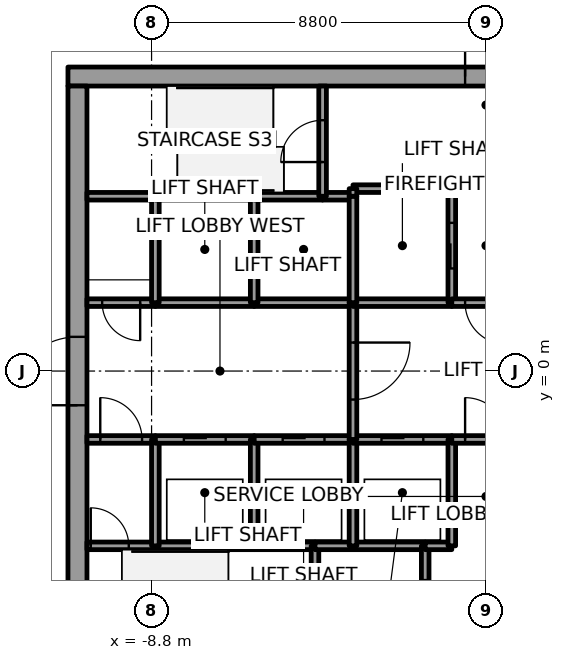
"""IFC4 building model, lengths in metres.
Left out: names, types, materials, properties, quantities, classifications, styles, units other than length and angle.
Written with IfcOpenShell. Run it as: python <this file> out.ifc"""

import sys

from ifc_helpers import new_model, si_unit, direction, frame, frame_2d, origin, place, context, subcontext, project, spatial, rectangle, extrude, element, fill, save


model = new_model("IFC4")
c1 = context("Model", 3, precision=1e-05, world=origin(), true_north=direction((0.0, 1.0)))
c2 = subcontext(c1, "Body", "Model", "MODEL_VIEW")
j1 = project(units=[si_unit("LENGTHUNIT", "METRE"), si_unit("PLANEANGLEUNIT", "RADIAN")], contexts=[c1])
p1 = place(None, origin())
s1 = spatial("IfcSite", under=j1, at=p1, CompositionType="ELEMENT")
p2 = place(p1, origin())
s2 = spatial("IfcBuilding", under=s1, at=p2, CompositionType="ELEMENT")
p3 = place(p2, frame((0.0, 0.0, 22.2)))
s3 = spatial("IfcBuildingStorey", under=s2, at=p3, CompositionType="ELEMENT", Elevation=22.2)
p4 = place(p3, frame((-11.0, 7.75, 0.0), z_axis=(0.0, 0.0, 1.0), x_axis=(1.0, 0.0, 0.0)))
e1 = element("IfcWall", 1, at=p4, inside=s3, PredefinedType="SHEAR", context=c2, shape_type="SweptSolid", body=[
    extrude(rectangle(XDim=22.0, YDim=0.5, at=frame_2d((11.0, 0.0))), origin(), (0.0, 0.0, 1.0), 6.6),
])
p5 = place(p4, frame((10.45, 0.0, 0.0)))
e2 = element("IfcOpeningElement", 2, at=p5, cuts=e1, PredefinedType="OPENING", context=c2, shape_type="SweptSolid", body=[
    extrude(rectangle(XDim=1.1, YDim=2.1, at=frame_2d((0.55, 1.05))), frame((0.0, 0.25, 0.0), z_axis=(0.0, -1.0, 0.0), x_axis=(1.0, 0.0, 0.0)), (0.0, 0.0, 1.0), 0.5),
])
p6 = place(p3, frame((-10.75, -7.5, 0.0), z_axis=(0.0, 0.0, 1.0), x_axis=(0.0, 1.0, 0.0)))
e3 = element("IfcWall", 3, at=p6, inside=s3, PredefinedType="SHEAR", context=c2, shape_type="SweptSolid", body=[
    extrude(rectangle(XDim=15.0, YDim=0.5, at=frame_2d((7.5, 0.0))), origin(), (0.0, 0.0, 1.0), 6.6),
])
p7 = place(p6, frame((6.6, 0.0, 0.0)))
e4 = element("IfcOpeningElement", 4, at=p7, cuts=e3, PredefinedType="OPENING", context=c2, shape_type="SweptSolid", body=[
    extrude(rectangle(XDim=1.8, YDim=2.1, at=frame_2d((0.9, 1.05))), frame((0.0, 0.25, 0.0), z_axis=(0.0, -1.0, 0.0), x_axis=(1.0, 0.0, 0.0)), (0.0, 0.0, 1.0), 0.5),
])
p8 = place(p3, frame((-10.5, -4.6, 0.0), z_axis=(0.0, 0.0, 1.0), x_axis=(1.0, 0.0, 0.0)))
e5 = element("IfcWall", 5, at=p8, inside=s3, PredefinedType="SOLIDWALL", context=c2, shape_type="SweptSolid", body=[
    extrude(rectangle(XDim=1.8, YDim=0.2, at=frame_2d((0.9, 0.0))), origin(), (0.0, 0.0, 1.0), 6.35),
])
p9 = place(p8, frame((0.1, 0.0, 0.0)))
e6 = element("IfcOpeningElement", 6, at=p9, cuts=e5, PredefinedType="OPENING", context=c2, shape_type="SweptSolid", body=[
    extrude(rectangle(XDim=1.0, YDim=2.1, at=frame_2d((0.5, 1.05))), frame((0.0, 0.1, 0.0), z_axis=(0.0, -1.0, 0.0), x_axis=(1.0, 0.0, 0.0)), (0.0, 0.0, 1.0), 0.2),
])
p10 = place(p3, frame((-10.5, -1.8, 0.0), z_axis=(0.0, 0.0, 1.0), x_axis=(1.0, 0.0, 0.0)))
e7 = element("IfcWall", 7, at=p10, inside=s3, PredefinedType="SOLIDWALL", context=c2, shape_type="SweptSolid", body=[
    extrude(rectangle(XDim=1.8, YDim=0.2, at=frame_2d((0.9, 0.0))), origin(), (0.0, 0.0, 1.0), 6.35),
])
p11 = place(p10, frame((0.35, 0.0, 0.0)))
e8 = element("IfcOpeningElement", 8, at=p11, cuts=e7, PredefinedType="OPENING", context=c2, shape_type="SweptSolid", body=[
    extrude(rectangle(XDim=1.1, YDim=2.4, at=frame_2d((0.55, 1.2))), frame((0.0, 0.1, 0.0), z_axis=(0.0, -1.0, 0.0), x_axis=(1.0, 0.0, 0.0)), (0.0, 0.0, 1.0), 0.2),
])
p12 = place(p3, frame((-8.7, 1.8, 0.0), z_axis=(0.0, 0.0, 1.0), x_axis=(-1.0, 0.0, 0.0)))
e9 = element("IfcWall", 9, at=p12, inside=s3, PredefinedType="SOLIDWALL", context=c2, shape_type="SweptSolid", body=[
    extrude(rectangle(XDim=1.8, YDim=0.2, at=frame_2d((0.9, 0.0))), origin(), (0.0, 0.0, 1.0), 6.35),
])
p13 = place(p12, frame((0.4, 0.0, 0.0)))
e10 = element("IfcOpeningElement", 10, at=p13, cuts=e9, PredefinedType="OPENING", context=c2, shape_type="SweptSolid", body=[
    extrude(rectangle(XDim=1.0, YDim=2.4, at=frame_2d((0.5, 1.2))), frame((0.0, 0.1, 0.0), z_axis=(0.0, -1.0, 0.0), x_axis=(1.0, 0.0, 0.0)), (0.0, 0.0, 1.0), 0.2),
])
p14 = place(p3, frame((-8.7, 4.6, 0.0), z_axis=(0.0, 0.0, 1.0), x_axis=(-1.0, 0.0, 0.0)))
e11 = element("IfcWall", 11, at=p14, inside=s3, PredefinedType="SOLIDWALL", context=c2, shape_type="SweptSolid", body=[
    extrude(rectangle(XDim=1.8, YDim=0.2, at=frame_2d((0.9, 0.0))), origin(), (0.0, 0.0, 1.0), 6.35),
])
p15 = place(p3, frame((-8.7, -4.6, 0.0), z_axis=(0.0, 0.0, 1.0), x_axis=(1.0, 0.0, 0.0)))
e12 = element("IfcWall", 12, at=p15, inside=s3, PredefinedType="SOLIDWALL", context=c2, shape_type="SweptSolid", body=[
    extrude(rectangle(XDim=2.6, YDim=0.2, at=frame_2d((1.3, 0.0))), origin(), (0.0, 0.0, 1.0), 6.35),
])
p16 = place(p3, frame((-8.7, -4.6, 0.0), z_axis=(0.0, 0.0, 1.0), x_axis=(0.0, 1.0, 0.0)))
e13 = element("IfcWall", 13, at=p16, inside=s3, PredefinedType="SOLIDWALL", context=c2, shape_type="SweptSolid", body=[
    extrude(rectangle(XDim=2.8, YDim=0.2, at=frame_2d((1.4, 0.0))), origin(), (0.0, 0.0, 1.0), 6.35),
])
p17 = place(p3, frame((-8.7, -1.8, 0.0), z_axis=(0.0, 0.0, 1.0), x_axis=(1.0, 0.0, 0.0)))
e14 = element("IfcWall", 14, at=p17, inside=s3, PredefinedType="SOLIDWALL", context=c2, shape_type="SweptSolid", body=[
    extrude(rectangle(XDim=2.6, YDim=0.2, at=frame_2d((1.3, 0.0))), origin(), (0.0, 0.0, 1.0), 6.35),
])
p18 = place(p17, frame((0.75, 0.0, 0.0)))
e15 = element("IfcOpeningElement", 15, at=p18, cuts=e14, PredefinedType="OPENING", context=c2, shape_type="SweptSolid", body=[
    extrude(rectangle(XDim=1.1, YDim=2.1, at=frame_2d((0.55, 1.05))), frame((0.0, 0.1, 0.0), z_axis=(0.0, -1.0, 0.0), x_axis=(1.0, 0.0, 0.0)), (0.0, 0.0, 1.0), 0.2),
])
p19 = place(p3, frame((-6.1, 1.8, 0.0), z_axis=(0.0, 0.0, 1.0), x_axis=(-1.0, 0.0, 0.0)))
e16 = element("IfcWall", 16, at=p19, inside=s3, PredefinedType="SOLIDWALL", context=c2, shape_type="SweptSolid", body=[
    extrude(rectangle(XDim=2.6, YDim=0.2, at=frame_2d((1.3, 0.0))), origin(), (0.0, 0.0, 1.0), 6.35),
])
p20 = place(p3, frame((-8.7, 1.8, 0.0), z_axis=(0.0, 0.0, 1.0), x_axis=(0.0, 1.0, 0.0)))
e17 = element("IfcWall", 17, at=p20, inside=s3, PredefinedType="SOLIDWALL", context=c2, shape_type="SweptSolid", body=[
    extrude(rectangle(XDim=2.8, YDim=0.2, at=frame_2d((1.4, 0.0))), origin(), (0.0, 0.0, 1.0), 6.35),
])
p21 = place(p3, frame((-6.1, 4.6, 0.0), z_axis=(0.0, 0.0, 1.0), x_axis=(-1.0, 0.0, 0.0)))
e18 = element("IfcWall", 18, at=p21, inside=s3, PredefinedType="SOLIDWALL", context=c2, shape_type="SweptSolid", body=[
    extrude(rectangle(XDim=2.6, YDim=0.2, at=frame_2d((1.3, 0.0))), origin(), (0.0, 0.0, 1.0), 6.35),
])
p22 = place(p3, frame((-6.1, -4.6, 0.0), z_axis=(0.0, 0.0, 1.0), x_axis=(1.0, 0.0, 0.0)))
e19 = element("IfcWall", 19, at=p22, inside=s3, PredefinedType="SOLIDWALL", context=c2, shape_type="SweptSolid", body=[
    extrude(rectangle(XDim=1.6, YDim=0.2, at=frame_2d((0.8, 0.0))), origin(), (0.0, 0.0, 1.0), 6.35),
])
p23 = place(p3, frame((-6.1, -4.6, 0.0), z_axis=(0.0, 0.0, 1.0), x_axis=(0.0, 1.0, 0.0)))
e20 = element("IfcWall", 20, at=p23, inside=s3, PredefinedType="SOLIDWALL", context=c2, shape_type="SweptSolid", body=[
    extrude(rectangle(XDim=2.8, YDim=0.2, at=frame_2d((1.4, 0.0))), origin(), (0.0, 0.0, 1.0), 6.35),
])
p24 = place(p3, frame((-6.1, -1.8, 0.0), z_axis=(0.0, 0.0, 1.0), x_axis=(1.0, 0.0, 0.0)))
e21 = element("IfcWall", 21, at=p24, inside=s3, PredefinedType="SOLIDWALL", context=c2, shape_type="SweptSolid", body=[
    extrude(rectangle(XDim=2.6, YDim=0.2, at=frame_2d((1.3, 0.0))), origin(), (0.0, 0.0, 1.0), 6.35),
])
p25 = place(p24, frame((0.75, 0.0, 0.0)))
e22 = element("IfcOpeningElement", 22, at=p25, cuts=e21, PredefinedType="OPENING", context=c2, shape_type="SweptSolid", body=[
    extrude(rectangle(XDim=1.1, YDim=2.1, at=frame_2d((0.55, 1.05))), frame((0.0, 0.1, 0.0), z_axis=(0.0, -1.0, 0.0), x_axis=(1.0, 0.0, 0.0)), (0.0, 0.0, 1.0), 0.2),
])
p26 = place(p3, frame((-3.5, 1.8, 0.0), z_axis=(0.0, 0.0, 1.0), x_axis=(-1.0, 0.0, 0.0)))
e23 = element("IfcWall", 23, at=p26, inside=s3, PredefinedType="SOLIDWALL", context=c2, shape_type="SweptSolid", body=[
    extrude(rectangle(XDim=2.6, YDim=0.2, at=frame_2d((1.3, 0.0))), origin(), (0.0, 0.0, 1.0), 6.35),
])
p27 = place(p3, frame((-6.1, 1.8, 0.0), z_axis=(0.0, 0.0, 1.0), x_axis=(0.0, 1.0, 0.0)))
e24 = element("IfcWall", 24, at=p27, inside=s3, PredefinedType="SOLIDWALL", context=c2, shape_type="SweptSolid", body=[
    extrude(rectangle(XDim=2.8, YDim=0.2, at=frame_2d((1.4, 0.0))), origin(), (0.0, 0.0, 1.0), 6.35),
])
p28 = place(p3, frame((-4.3, 4.6, 0.0), z_axis=(0.0, 0.0, 1.0), x_axis=(-1.0, 0.0, 0.0)))
e25 = element("IfcWall", 25, at=p28, inside=s3, PredefinedType="SOLIDWALL", context=c2, shape_type="SweptSolid", body=[
    extrude(rectangle(XDim=1.8, YDim=0.2, at=frame_2d((0.9, 0.0))), origin(), (0.0, 0.0, 1.0), 6.35),
])
p29 = place(p3, frame((-4.5, -4.6, 0.0), z_axis=(0.0, 0.0, 1.0), x_axis=(0.0, -1.0, 0.0)))
e26 = element("IfcWall", 26, at=p29, inside=s3, PredefinedType="SOLIDWALL", context=c2, shape_type="SweptSolid", body=[
    extrude(rectangle(XDim=2.9, YDim=0.2, at=frame_2d((1.45, 0.0))), origin(), (0.0, 0.0, 1.0), 6.35),
])
p30 = place(p3, frame((-4.5, -4.6, 0.0), z_axis=(0.0, 0.0, 1.0), x_axis=(1.0, 0.0, 0.0)))
e27 = element("IfcWall", 27, at=p30, inside=s3, PredefinedType="SOLIDWALL", context=c2, shape_type="SweptSolid", body=[
    extrude(rectangle(XDim=1.0, YDim=0.2, at=frame_2d((0.5, 0.0))), origin(), (0.0, 0.0, 1.0), 6.35),
])
p31 = place(p3, frame((-3.5, 4.6, 0.0), z_axis=(0.0, 0.0, 1.0), x_axis=(-1.0, 0.0, 0.0)))
e28 = element("IfcWall", 28, at=p31, inside=s3, PredefinedType="SOLIDWALL", context=c2, shape_type="SweptSolid", body=[
    extrude(rectangle(XDim=0.8, YDim=0.2, at=frame_2d((0.4, 0.0))), origin(), (0.0, 0.0, 1.0), 6.35),
])
p32 = place(p3, frame((-4.3, 4.6, 0.0), z_axis=(0.0, 0.0, 1.0), x_axis=(0.0, 1.0, 0.0)))
e29 = element("IfcWall", 29, at=p32, inside=s3, PredefinedType="SOLIDWALL", context=c2, shape_type="SweptSolid", body=[
    extrude(rectangle(XDim=2.9, YDim=0.2, at=frame_2d((1.45, 0.0))), origin(), (0.0, 0.0, 1.0), 6.35),
])
p33 = place(p32, frame((0.9, 0.0, 0.0)))
e30 = element("IfcOpeningElement", 30, at=p33, cuts=e29, PredefinedType="OPENING", context=c2, shape_type="SweptSolid", body=[
    extrude(rectangle(XDim=1.1, YDim=2.4, at=frame_2d((0.55, 1.2))), frame((0.0, 0.1, 0.0), z_axis=(0.0, -1.0, 0.0), x_axis=(1.0, 0.0, 0.0)), (0.0, 0.0, 1.0), 0.2),
])
p34 = place(p3, frame((-3.5, -4.6, 0.0), z_axis=(0.0, 0.0, 1.0), x_axis=(1.0, 0.0, 0.0)))
e31 = element("IfcWall", 31, at=p34, inside=s3, PredefinedType="SOLIDWALL", context=c2, shape_type="SweptSolid", body=[
    extrude(rectangle(XDim=1.9, YDim=0.2, at=frame_2d((0.95, 0.0))), origin(), (0.0, 0.0, 1.0), 6.35),
])
p35 = place(p3, frame((-3.5, -4.6, 0.0), z_axis=(0.0, 0.0, 1.0), x_axis=(0.0, 1.0, 0.0)))
e32 = element("IfcWall", 32, at=p35, inside=s3, PredefinedType="SOLIDWALL", context=c2, shape_type="SweptSolid", body=[
    extrude(rectangle(XDim=2.8, YDim=0.2, at=frame_2d((1.4, 0.0))), origin(), (0.0, 0.0, 1.0), 6.35),
])
p36 = place(p3, frame((-3.5, -1.8, 0.0), z_axis=(0.0, 0.0, 1.0), x_axis=(1.0, 0.0, 0.0)))
e33 = element("IfcWall", 33, at=p36, inside=s3, PredefinedType="SOLIDWALL", context=c2, shape_type="SweptSolid", body=[
    extrude(rectangle(XDim=2.6, YDim=0.2, at=frame_2d((1.3, 0.0))), origin(), (0.0, 0.0, 1.0), 6.35),
])
p37 = place(p36, frame((0.75, 0.0, 0.0)))
e34 = element("IfcOpeningElement", 34, at=p37, cuts=e33, PredefinedType="OPENING", context=c2, shape_type="SweptSolid", body=[
    extrude(rectangle(XDim=1.1, YDim=2.1, at=frame_2d((0.55, 1.05))), frame((0.0, 0.1, 0.0), z_axis=(0.0, -1.0, 0.0), x_axis=(1.0, 0.0, 0.0)), (0.0, 0.0, 1.0), 0.2),
])
p38 = place(p3, frame((-3.5, 1.8, 0.0), z_axis=(0.0, 0.0, 1.0), x_axis=(0.0, -1.0, 0.0)))
e35 = element("IfcWall", 35, at=p38, inside=s3, PredefinedType="SOLIDWALL", context=c2, shape_type="SweptSolid", body=[
    extrude(rectangle(XDim=3.6, YDim=0.2, at=frame_2d((1.8, 0.0))), origin(), (0.0, 0.0, 1.0), 6.35),
])
p39 = place(p38, frame((1.05, 0.0, 0.0)))
e36 = element("IfcOpeningElement", 36, at=p39, cuts=e35, PredefinedType="OPENING", context=c2, shape_type="SweptSolid", body=[
    extrude(rectangle(XDim=1.5, YDim=2.4, at=frame_2d((0.75, 1.2))), frame((0.0, 0.1, 0.0), z_axis=(0.0, -1.0, 0.0), x_axis=(1.0, 0.0, 0.0)), (0.0, 0.0, 1.0), 0.2),
])
p40 = place(p3, frame((-0.9, 1.8, 0.0), z_axis=(0.0, 0.0, 1.0), x_axis=(-1.0, 0.0, 0.0)))
e37 = element("IfcWall", 37, at=p40, inside=s3, PredefinedType="SOLIDWALL", context=c2, shape_type="SweptSolid", body=[
    extrude(rectangle(XDim=2.6, YDim=0.2, at=frame_2d((1.3, 0.0))), origin(), (0.0, 0.0, 1.0), 6.35),
])
p41 = place(p3, frame((-3.5, 4.6, 0.0), z_axis=(0.0, 0.0, 1.0), x_axis=(0.0, -1.0, 0.0)))
e38 = element("IfcWall", 38, at=p41, inside=s3, PredefinedType="SOLIDWALL", context=c2, shape_type="SweptSolid", body=[
    extrude(rectangle(XDim=2.8, YDim=0.2, at=frame_2d((1.4, 0.0))), origin(), (0.0, 0.0, 1.0), 6.35),
])
p42 = place(p3, frame((-0.9, 1.8, 0.0), z_axis=(0.0, 0.0, 1.0), x_axis=(0.0, 1.0, 0.0)))
e39 = element("IfcWall", 39, at=p42, inside=s3, PredefinedType="SOLIDWALL", context=c2, shape_type="SweptSolid", body=[
    extrude(rectangle(XDim=3.0, YDim=0.2, at=frame_2d((1.5, 0.0))), origin(), (0.0, 0.0, 1.0), 6.35),
])
p43 = place(p42, frame((0.9, 0.0, 0.0)))
e40 = element("IfcOpeningElement", 40, at=p43, cuts=e39, PredefinedType="OPENING", context=c2, shape_type="SweptSolid", body=[
    extrude(rectangle(XDim=1.2, YDim=2.1, at=frame_2d((0.6, 1.05))), frame((0.0, 0.1, 0.0), z_axis=(0.0, -1.0, 0.0), x_axis=(1.0, 0.0, 0.0)), (0.0, 0.0, 1.0), 0.2),
])
p44 = place(p3, frame((-0.9, 4.8, 0.0), z_axis=(0.0, 0.0, 1.0), x_axis=(-1.0, 0.0, 0.0)))
e41 = element("IfcWall", 41, at=p44, inside=s3, PredefinedType="SOLIDWALL", context=c2, shape_type="SweptSolid", body=[
    extrude(rectangle(XDim=2.6, YDim=0.2, at=frame_2d((1.3, 0.0))), origin(), (0.0, 0.0, 1.0), 6.35),
])
p45 = place(p3, frame((-3.5, 4.8, 0.0), z_axis=(0.0, 0.0, 1.0), x_axis=(0.0, -1.0, 0.0)))
e42 = element("IfcWall", 42, at=p45, inside=s3, PredefinedType="SOLIDWALL", context=c2, shape_type="SweptSolid", body=[
    extrude(rectangle(XDim=0.2, YDim=0.2, at=frame_2d((0.1, 0.0))), origin(), (0.0, 0.0, 1.0), 6.35),
])
p46 = place(p3, frame((-1.6, -7.5, 0.0), z_axis=(0.0, 0.0, 1.0), x_axis=(0.0, 1.0, 0.0)))
e43 = element("IfcWall", 43, at=p46, inside=s3, PredefinedType="SOLIDWALL", context=c2, shape_type="SweptSolid", body=[
    extrude(rectangle(XDim=2.9, YDim=0.2, at=frame_2d((1.45, 0.0))), origin(), (0.0, 0.0, 1.0), 6.35),
])
p47 = place(p46, frame((0.9, 0.0, 0.0)))
e44 = element("IfcOpeningElement", 44, at=p47, cuts=e43, PredefinedType="OPENING", context=c2, shape_type="SweptSolid", body=[
    extrude(rectangle(XDim=1.1, YDim=2.1, at=frame_2d((0.55, 1.05))), frame((0.0, 0.1, 0.0), z_axis=(0.0, -1.0, 0.0), x_axis=(1.0, 0.0, 0.0)), (0.0, 0.0, 1.0), 0.2),
])
p48 = place(p3, frame((-1.6, -4.6, 0.0), z_axis=(0.0, 0.0, 1.0), x_axis=(1.0, 0.0, 0.0)))
e45 = element("IfcWall", 45, at=p48, inside=s3, PredefinedType="SOLIDWALL", context=c2, shape_type="SweptSolid", body=[
    extrude(rectangle(XDim=0.7, YDim=0.2, at=frame_2d((0.35, 0.0))), origin(), (0.0, 0.0, 1.0), 6.35),
])
p49 = place(p3, frame((-0.9, -4.6, 0.0), z_axis=(0.0, 0.0, 1.0), x_axis=(0.0, 1.0, 0.0)))
e46 = element("IfcWall", 46, at=p49, inside=s3, PredefinedType="SOLIDWALL", context=c2, shape_type="SweptSolid", body=[
    extrude(rectangle(XDim=2.8, YDim=0.2, at=frame_2d((1.4, 0.0))), origin(), (0.0, 0.0, 1.0), 6.35),
])
p50 = place(p3, frame((-0.9, -1.8, 0.0), z_axis=(0.0, 0.0, 1.0), x_axis=(1.0, 0.0, 0.0)))
e47 = element("IfcWall", 47, at=p50, inside=s3, PredefinedType="SOLIDWALL", context=c2, shape_type="SweptSolid", body=[
    extrude(rectangle(XDim=1.8, YDim=0.2, at=frame_2d((0.9, 0.0))), origin(), (0.0, 0.0, 1.0), 6.35),
])
p51 = place(p50, frame((0.35, 0.0, 0.0)))
e48 = element("IfcOpeningElement", 48, at=p51, cuts=e47, PredefinedType="OPENING", context=c2, shape_type="SweptSolid", body=[
    extrude(rectangle(XDim=1.1, YDim=2.4, at=frame_2d((0.55, 1.2))), frame((0.0, 0.1, 0.0), z_axis=(0.0, -1.0, 0.0), x_axis=(1.0, 0.0, 0.0)), (0.0, 0.0, 1.0), 0.2),
])
p52 = place(p3, frame((0.9, 1.8, 0.0), z_axis=(0.0, 0.0, 1.0), x_axis=(-1.0, 0.0, 0.0)))
e49 = element("IfcWall", 49, at=p52, inside=s3, PredefinedType="SOLIDWALL", context=c2, shape_type="SweptSolid", body=[
    extrude(rectangle(XDim=1.8, YDim=0.2, at=frame_2d((0.9, 0.0))), origin(), (0.0, 0.0, 1.0), 6.35),
])
p53 = place(p52, frame((0.35, 0.0, 0.0)))
e50 = element("IfcOpeningElement", 50, at=p53, cuts=e49, PredefinedType="OPENING", context=c2, shape_type="SweptSolid", body=[
    extrude(rectangle(XDim=1.1, YDim=2.4, at=frame_2d((0.55, 1.2))), frame((0.0, 0.1, 0.0), z_axis=(0.0, -1.0, 0.0), x_axis=(1.0, 0.0, 0.0)), (0.0, 0.0, 1.0), 0.2),
])
p54 = place(p18, origin())
e51 = element("IfcDoor", 51, at=p54, inside=s3, OperationType="SLIDING_TO_RIGHT", PredefinedType="DOOR", context=c2, shape_type="SweptSolid", body=[
    extrude(rectangle(XDim=1.1, YDim=2.1, at=frame_2d((0.55, 1.05))), frame((0.0, 0.025, 0.0), z_axis=(0.0, -1.0, 0.0), x_axis=(1.0, 0.0, 0.0)), (0.0, 0.0, 1.0), 0.05),
])
fill(e15, e51)
p55 = place(p25, origin())
e52 = element("IfcDoor", 52, at=p55, inside=s3, OperationType="SLIDING_TO_RIGHT", PredefinedType="DOOR", context=c2, shape_type="SweptSolid", body=[
    extrude(rectangle(XDim=1.1, YDim=2.1, at=frame_2d((0.55, 1.05))), frame((0.0, 0.025, 0.0), z_axis=(0.0, -1.0, 0.0), x_axis=(1.0, 0.0, 0.0)), (0.0, 0.0, 1.0), 0.05),
])
fill(e22, e52)
p56 = place(p37, origin())
e53 = element("IfcDoor", 53, at=p56, inside=s3, OperationType="SLIDING_TO_RIGHT", PredefinedType="DOOR", context=c2, shape_type="SweptSolid", body=[
    extrude(rectangle(XDim=1.1, YDim=2.1, at=frame_2d((0.55, 1.05))), frame((0.0, 0.025, 0.0), z_axis=(0.0, -1.0, 0.0), x_axis=(1.0, 0.0, 0.0)), (0.0, 0.0, 1.0), 0.05),
])
fill(e34, e53)
p57 = place(p43, origin())
e54 = element("IfcDoor", 54, at=p57, inside=s3, OperationType="SLIDING_TO_LEFT", PredefinedType="DOOR", context=c2, shape_type="SweptSolid", body=[
    extrude(rectangle(XDim=1.2, YDim=2.1, at=frame_2d((0.6, 1.05))), frame((0.0, 0.025, 0.0), z_axis=(0.0, -1.0, 0.0), x_axis=(1.0, 0.0, 0.0)), (0.0, 0.0, 1.0), 0.05),
])
fill(e40, e54)
p58 = place(p39, origin())
e55 = element("IfcDoor", 55, at=p58, inside=s3, OperationType="DOUBLE_DOOR_SINGLE_SWING", PredefinedType="DOOR", context=c2, shape_type="SweptSolid", body=[
    extrude(rectangle(XDim=1.5, YDim=2.4, at=frame_2d((0.75, 1.2))), frame((0.0, 0.025, 0.0), z_axis=(0.0, -1.0, 0.0), x_axis=(1.0, 0.0, 0.0)), (0.0, 0.0, 1.0), 0.05),
])
fill(e36, e55)
p59 = place(p11, origin())
e56 = element("IfcDoor", 56, at=p59, inside=s3, OperationType="SINGLE_SWING_RIGHT", PredefinedType="DOOR", context=c2, shape_type="SweptSolid", body=[
    extrude(rectangle(XDim=1.1, YDim=2.4, at=frame_2d((0.55, 1.2))), frame((0.0, 0.025, 0.0), z_axis=(0.0, -1.0, 0.0), x_axis=(1.0, 0.0, 0.0)), (0.0, 0.0, 1.0), 0.05),
])
fill(e8, e56)
p60 = place(p53, origin())
e57 = element("IfcDoor", 57, at=p60, inside=s3, OperationType="SINGLE_SWING_LEFT", PredefinedType="DOOR", context=c2, shape_type="SweptSolid", body=[
    extrude(rectangle(XDim=1.1, YDim=2.4, at=frame_2d((0.55, 1.2))), frame((0.0, 0.025, 0.0), z_axis=(0.0, -1.0, 0.0), x_axis=(1.0, 0.0, 0.0)), (0.0, 0.0, 1.0), 0.05),
])
fill(e50, e57)
p61 = place(p51, origin())
e58 = element("IfcDoor", 58, at=p61, inside=s3, OperationType="SINGLE_SWING_RIGHT", PredefinedType="DOOR", context=c2, shape_type="SweptSolid", body=[
    extrude(rectangle(XDim=1.1, YDim=2.4, at=frame_2d((0.55, 1.2))), frame((0.0, 0.025, 0.0), z_axis=(0.0, -1.0, 0.0), x_axis=(1.0, 0.0, 0.0)), (0.0, 0.0, 1.0), 0.05),
])
fill(e48, e58)
p62 = place(p13, origin())
e59 = element("IfcDoor", 59, at=p62, inside=s3, OperationType="SINGLE_SWING_LEFT", PredefinedType="DOOR", context=c2, shape_type="SweptSolid", body=[
    extrude(rectangle(XDim=1.0, YDim=2.4, at=frame_2d((0.5, 1.2))), frame((0.0, 0.025, 0.0), z_axis=(0.0, -1.0, 0.0), x_axis=(1.0, 0.0, 0.0)), (0.0, 0.0, 1.0), 0.05),
])
fill(e10, e59)
p63 = place(p9, origin())
e60 = element("IfcDoor", 60, at=p63, inside=s3, OperationType="SINGLE_SWING_LEFT", PredefinedType="DOOR", context=c2, shape_type="SweptSolid", body=[
    extrude(rectangle(XDim=1.0, YDim=2.1, at=frame_2d((0.5, 1.05))), frame((0.0, 0.025, 0.0), z_axis=(0.0, -1.0, 0.0), x_axis=(1.0, 0.0, 0.0)), (0.0, 0.0, 1.0), 0.05),
])
fill(e6, e60)
p64 = place(p33, origin())
e61 = element("IfcDoor", 61, at=p64, inside=s3, OperationType="SINGLE_SWING_LEFT", PredefinedType="DOOR", context=c2, shape_type="SweptSolid", body=[
    extrude(rectangle(XDim=1.1, YDim=2.4, at=frame_2d((0.55, 1.2))), frame((0.0, 0.025, 0.0), z_axis=(0.0, -1.0, 0.0), x_axis=(1.0, 0.0, 0.0)), (0.0, 0.0, 1.0), 0.05),
])
fill(e30, e61)
p65 = place(p7, origin())
e62 = element("IfcDoor", 62, at=p65, inside=s3, OperationType="DOUBLE_DOOR_SINGLE_SWING", PredefinedType="DOOR", context=c2, shape_type="SweptSolid", body=[
    extrude(rectangle(XDim=1.8, YDim=2.1, at=frame_2d((0.9, 1.05))), frame((0.0, 0.025, 0.0), z_axis=(0.0, -1.0, 0.0), x_axis=(1.0, 0.0, 0.0)), (0.0, 0.0, 1.0), 0.05),
])
fill(e4, e62)
p66 = place(p5, origin())
e63 = element("IfcDoor", 63, at=p66, inside=s3, OperationType="SINGLE_SWING_LEFT", PredefinedType="DOOR", context=c2, shape_type="SweptSolid", body=[
    extrude(rectangle(XDim=1.1, YDim=2.1, at=frame_2d((0.55, 1.05))), frame((0.0, 0.025, 0.0), z_axis=(0.0, -1.0, 0.0), x_axis=(1.0, 0.0, 0.0)), (0.0, 0.0, 1.0), 0.05),
])
fill(e2, e63)
save(model, sys.argv[1])
